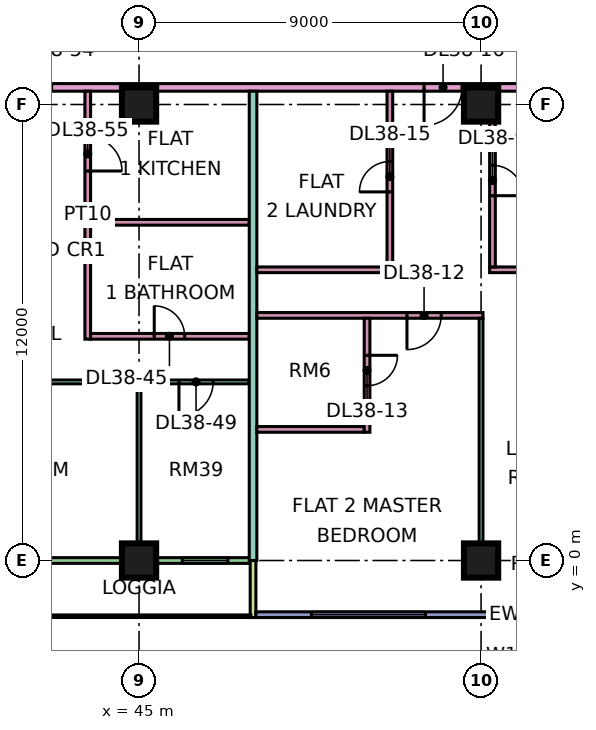
"""IFC4 building model, lengths in metres.
Left out: names, types, materials, properties, quantities, classifications, styles, units other than length and angle.
Written with IfcOpenShell. Run it as: python <this file> out.ifc"""

import sys

from ifc_helpers import new_model, si_unit, direction, frame, frame_2d, origin, origin_2d, place, context, subcontext, project, spatial, rectangle, extrude, element, fill, save


model = new_model("IFC4")
c1 = context("Model", 3, precision=1e-05, world=origin(), true_north=direction((0.0, 1.0)))
c2 = subcontext(c1, "Body", "Model", "MODEL_VIEW")
j1 = project(units=[si_unit("LENGTHUNIT", "METRE"), si_unit("PLANEANGLEUNIT", "RADIAN")], contexts=[c1])
p1 = place(None, origin())
s1 = spatial("IfcSite", under=j1, at=p1, CompositionType="ELEMENT")
p2 = place(p1, origin())
s2 = spatial("IfcBuilding", under=s1, at=p2, CompositionType="ELEMENT")
p3 = place(p2, frame((0.0, 0.0, 168.65)))
s3 = spatial("IfcBuildingStorey", under=s2, at=p3, CompositionType="ELEMENT", Elevation=168.65)
for number, where, z_axis, x_axis in (
    (1, (45.0, 0.0, 0.0), (0.0, 0.0, 1.0), (1.0, 0.0, 0.0)),
    (2, (45.0, 12.0, 0.0), (0.0, 0.0, 1.0), (1.0, 0.0, 0.0)),
    (3, (54.0, 0.0, 0.0), (0.0, 0.0, 1.0), (1.0, 0.0, 0.0)),
    (4, (54.0, 12.0, 0.0), (0.0, 0.0, 1.0), (1.0, 0.0, 0.0)),
):
    element("IfcColumn", number, at=place(p3, frame(where, z_axis=z_axis, x_axis=x_axis)), inside=s3, PredefinedType="COLUMN", context=c2, shape_type="SweptSolid", body=[
        extrude(rectangle(XDim=0.9, YDim=0.9, at=origin_2d()), origin(), (0.0, 0.0, 1.0), 3.75),
    ])
p4 = place(p3, frame((36.075, 0.0, 0.0), z_axis=(0.0, 0.0, 1.0), x_axis=(1.0, 0.0, 0.0)))
e5 = element("IfcWall", 5, at=p4, inside=s3, PredefinedType="SOLIDWALL", context=c2, shape_type="SweptSolid", body=[
    extrude(rectangle(XDim=11.85, YDim=0.15, at=frame_2d((5.925, 0.0))), origin(), (0.0, 0.0, 1.0), 3.35),
])
p5 = place(p4, frame((3.525, 0.0, 0.0)))
e6 = element("IfcOpeningElement", 6, at=p5, cuts=e5, PredefinedType="OPENING", context=c2, shape_type="SweptSolid", body=[
    extrude(rectangle(XDim=1.8, YDim=2.4, at=frame_2d((0.9, 1.2))), frame((0.0, 0.085, 0.0), z_axis=(0.0, -1.0, 0.0), x_axis=(1.0, 0.0, 0.0)), (0.0, 0.0, 1.0), 0.17),
])
p6 = place(p4, frame((10.062, 0.0, 0.45)))
e7 = element("IfcOpeningElement", 7, at=p6, cuts=e5, PredefinedType="OPENING", context=c2, shape_type="SweptSolid", body=[
    extrude(rectangle(XDim=1.2, YDim=2.4, at=frame_2d((0.6, 1.2))), frame((0.0, 0.085, 0.0), z_axis=(0.0, -1.0, 0.0), x_axis=(1.0, 0.0, 0.0)), (0.0, 0.0, 1.0), 0.17),
])
p7 = place(p3, frame((48.0, -1.5, 0.0), z_axis=(0.0, 0.0, 1.0), x_axis=(0.0, 1.0, 0.0)))
e8 = element("IfcWall", 8, at=p7, inside=s3, PredefinedType="SOLIDWALL", context=c2, shape_type="SweptSolid", body=[
    extrude(rectangle(XDim=1.5, YDim=0.15, at=frame_2d((0.75, 0.0))), origin(), (0.0, 0.0, 1.0), 3.35),
])
p8 = place(p3, frame((48.075, -1.425, 0.0), z_axis=(0.0, 0.0, 1.0), x_axis=(1.0, 0.0, 0.0)))
e9 = element("IfcWall", 9, at=p8, inside=s3, PredefinedType="SOLIDWALL", context=c2, shape_type="SweptSolid", body=[
    extrude(rectangle(XDim=13.425, YDim=0.15, at=frame_2d((6.712, 0.0))), origin(), (0.0, 0.0, 1.0), 3.35),
])
p9 = place(p8, frame((1.462, 0.0, 0.45)))
e10 = element("IfcOpeningElement", 10, at=p9, cuts=e9, PredefinedType="OPENING", context=c2, shape_type="SweptSolid", body=[
    extrude(rectangle(XDim=3.0, YDim=2.4, at=frame_2d((1.5, 1.2))), frame((0.0, 0.085, 0.0), z_axis=(0.0, -1.0, 0.0), x_axis=(1.0, 0.0, 0.0)), (0.0, 0.0, 1.0), 0.17),
])
p10 = place(p8, frame((6.525, 0.0, 0.45)))
e11 = element("IfcOpeningElement", 11, at=p10, cuts=e9, PredefinedType="OPENING", context=c2, shape_type="SweptSolid", body=[
    extrude(rectangle(XDim=1.8, YDim=2.4, at=frame_2d((0.9, 1.2))), frame((0.0, 0.085, 0.0), z_axis=(0.0, -1.0, 0.0), x_axis=(1.0, 0.0, 0.0)), (0.0, 0.0, 1.0), 0.17),
])
p11 = place(p8, frame((9.525, 0.0, 0.45)))
e12 = element("IfcOpeningElement", 12, at=p11, cuts=e9, PredefinedType="OPENING", context=c2, shape_type="SweptSolid", body=[
    extrude(rectangle(XDim=1.8, YDim=2.4, at=frame_2d((0.9, 1.2))), frame((0.0, 0.085, 0.0), z_axis=(0.0, -1.0, 0.0), x_axis=(1.0, 0.0, 0.0)), (0.0, 0.0, 1.0), 0.17),
])
p12 = place(p8, frame((12.225, 0.0, 0.45)))
e13 = element("IfcOpeningElement", 13, at=p12, cuts=e9, PredefinedType="OPENING", context=c2, shape_type="SweptSolid", body=[
    extrude(rectangle(XDim=0.9, YDim=2.4, at=frame_2d((0.45, 1.2))), frame((0.0, 0.085, 0.0), z_axis=(0.0, -1.0, 0.0), x_axis=(1.0, 0.0, 0.0)), (0.0, 0.0, 1.0), 0.17),
])
p13 = place(p3, frame((33.05, 4.7, 0.0), z_axis=(0.0, 0.0, 1.0), x_axis=(1.0, 0.0, 0.0)))
e14 = element("IfcWall", 14, at=p13, inside=s3, PredefinedType="PARTITIONING", context=c2, shape_type="SweptSolid", body=[
    extrude(rectangle(XDim=14.85, YDim=0.1, at=frame_2d((7.425, 0.0))), origin(), (0.0, 0.0, 1.0), 3.35),
])
p14 = place(p13, frame((1.0, 0.0, 0.0)))
e15 = element("IfcOpeningElement", 15, at=p14, cuts=e14, PredefinedType="OPENING", context=c2, shape_type="SweptSolid", body=[
    extrude(rectangle(XDim=0.9, YDim=2.1, at=frame_2d((0.45, 1.05))), frame((0.0, 0.06, 0.0), z_axis=(0.0, -1.0, 0.0), x_axis=(1.0, 0.0, 0.0)), (0.0, 0.0, 1.0), 0.12),
])
p15 = place(p13, frame((13.0, 0.0, 0.0)))
e16 = element("IfcOpeningElement", 16, at=p15, cuts=e14, PredefinedType="OPENING", context=c2, shape_type="SweptSolid", body=[
    extrude(rectangle(XDim=0.9, YDim=2.1, at=frame_2d((0.45, 1.05))), frame((0.0, 0.06, 0.0), z_axis=(0.0, -1.0, 0.0), x_axis=(1.0, 0.0, 0.0)), (0.0, 0.0, 1.0), 0.12),
])
p16 = place(p13, frame((7.0, 0.0, 0.0)))
e17 = element("IfcOpeningElement", 17, at=p16, cuts=e14, PredefinedType="OPENING", context=c2, shape_type="SweptSolid", body=[
    extrude(rectangle(XDim=0.9, YDim=2.1, at=frame_2d((0.45, 1.05))), frame((0.0, 0.06, 0.0), z_axis=(0.0, -1.0, 0.0), x_axis=(1.0, 0.0, 0.0)), (0.0, 0.0, 1.0), 0.12),
])
p17 = place(p3, frame((40.65, 12.45, 0.0), z_axis=(0.0, 0.0, 1.0), x_axis=(1.0, 0.0, 0.0)))
e18 = element("IfcWall", 18, at=p17, inside=s3, PredefinedType="PARTITIONING", context=c2, shape_type="SweptSolid", body=[
    extrude(rectangle(XDim=22.276, YDim=0.2, at=frame_2d((11.138, 0.0))), origin(), (0.0, 0.0, 1.0), 3.35),
])
p18 = place(p17, frame((11.85, 0.0, 0.0)))
e19 = element("IfcOpeningElement", 19, at=p18, cuts=e18, PredefinedType="OPENING", context=c2, shape_type="SweptSolid", body=[
    extrude(rectangle(XDim=1.0, YDim=2.1, at=frame_2d((0.5, 1.05))), frame((0.0, 0.11, 0.0), z_axis=(0.0, -1.0, 0.0), x_axis=(1.0, 0.0, 0.0)), (0.0, 0.0, 1.0), 0.22),
])
p19 = place(p17, frame((1.05, 0.0, 0.0)))
e20 = element("IfcOpeningElement", 20, at=p19, cuts=e18, PredefinedType="OPENING", context=c2, shape_type="SweptSolid", body=[
    extrude(rectangle(XDim=1.0, YDim=2.1, at=frame_2d((0.5, 1.05))), frame((0.0, 0.11, 0.0), z_axis=(0.0, -1.0, 0.0), x_axis=(1.0, 0.0, 0.0)), (0.0, 0.0, 1.0), 0.22),
])
p20 = place(p3, frame((43.65, 5.825, 0.0), z_axis=(0.0, 0.0, 1.0), x_axis=(0.0, 1.0, 0.0)))
e21 = element("IfcWall", 21, at=p20, inside=s3, PredefinedType="PARTITIONING", context=c2, shape_type="SweptSolid", body=[
    extrude(rectangle(XDim=6.525, YDim=0.15, at=frame_2d((3.263, 0.0))), origin(), (0.0, 0.0, 1.0), 3.35),
])
p21 = place(p20, frame((4.425, 0.0, 0.0)))
e22 = element("IfcOpeningElement", 22, at=p21, cuts=e21, PredefinedType="OPENING", context=c2, shape_type="SweptSolid", body=[
    extrude(rectangle(XDim=0.9, YDim=2.1, at=frame_2d((0.45, 1.05))), frame((0.0, 0.085, 0.0), z_axis=(0.0, -1.0, 0.0), x_axis=(1.0, 0.0, 0.0)), (0.0, 0.0, 1.0), 0.17),
])
p22 = place(p3, frame((43.725, 5.9, 0.0), z_axis=(0.0, 0.0, 1.0), x_axis=(1.0, 0.0, 0.0)))
e23 = element("IfcWall", 23, at=p22, inside=s3, PredefinedType="PARTITIONING", context=c2, shape_type="SweptSolid", body=[
    extrude(rectangle(XDim=4.175, YDim=0.15, at=frame_2d((2.087, 0.0))), origin(), (0.0, 0.0, 1.0), 3.35),
])
p23 = place(p22, frame((1.675, 0.0, 0.0)))
e24 = element("IfcOpeningElement", 24, at=p23, cuts=e23, PredefinedType="OPENING", context=c2, shape_type="SweptSolid", body=[
    extrude(rectangle(XDim=0.8, YDim=2.1, at=frame_2d((0.4, 1.05))), frame((0.0, 0.085, 0.0), z_axis=(0.0, -1.0, 0.0), x_axis=(1.0, 0.0, 0.0)), (0.0, 0.0, 1.0), 0.17),
])
p24 = place(p3, frame((43.725, 8.9, 0.0), z_axis=(0.0, 0.0, 1.0), x_axis=(1.0, 0.0, 0.0)))
e25 = element("IfcWall", 25, at=p24, inside=s3, PredefinedType="PARTITIONING", context=c2, shape_type="SweptSolid", body=[
    extrude(rectangle(XDim=4.175, YDim=0.15, at=frame_2d((2.087, 0.0))), origin(), (0.0, 0.0, 1.0), 3.35),
])
p25 = place(p3, frame((45.0, 0.074, 0.0), z_axis=(0.0, 0.0, 1.0), x_axis=(0.0, 1.0, 0.0)))
e26 = element("IfcWall", 26, at=p25, inside=s3, PredefinedType="PARTITIONING", context=c2, shape_type="SweptSolid", body=[
    extrude(rectangle(XDim=4.576, YDim=0.1, at=frame_2d((2.288, 0.0))), origin(), (0.0, 0.0, 1.0), 3.35),
])
p26 = place(p3, frame((48.0, 0.0, 0.0), z_axis=(0.0, 0.0, 1.0), x_axis=(0.0, 1.0, 0.0)))
e27 = element("IfcWall", 27, at=p26, inside=s3, PredefinedType="PARTITIONING", context=c2, shape_type="SweptSolid", body=[
    extrude(rectangle(XDim=12.35, YDim=0.2, at=frame_2d((6.175, 0.0))), origin(), (0.0, 0.0, 1.0), 3.35),
])
p27 = place(p3, frame((48.1, 3.45, 0.0), z_axis=(0.0, 0.0, 1.0), x_axis=(1.0, 0.0, 0.0)))
e28 = element("IfcWall", 28, at=p27, inside=s3, PredefinedType="PARTITIONING", context=c2, shape_type="SweptSolid", body=[
    extrude(rectangle(XDim=2.825, YDim=0.15, at=frame_2d((1.413, 0.0))), origin(), (0.0, 0.0, 1.0), 3.35),
])
p28 = place(p3, frame((48.1, 6.45, 0.0), z_axis=(0.0, 0.0, 1.0), x_axis=(1.0, 0.0, 0.0)))
e29 = element("IfcWall", 29, at=p28, inside=s3, PredefinedType="PARTITIONING", context=c2, shape_type="SweptSolid", body=[
    extrude(rectangle(XDim=5.95, YDim=0.15, at=frame_2d((2.975, 0.0))), origin(), (0.0, 0.0, 1.0), 3.35),
])
p29 = place(p28, frame((3.95, 0.0, 0.0)))
e30 = element("IfcOpeningElement", 30, at=p29, cuts=e29, PredefinedType="OPENING", context=c2, shape_type="SweptSolid", body=[
    extrude(rectangle(XDim=0.9, YDim=2.1, at=frame_2d((0.45, 1.05))), frame((0.0, 0.085, 0.0), z_axis=(0.0, -1.0, 0.0), x_axis=(1.0, 0.0, 0.0)), (0.0, 0.0, 1.0), 0.17),
])
p30 = place(p3, frame((48.1, 7.65, 0.0), z_axis=(0.0, 0.0, 1.0), x_axis=(1.0, 0.0, 0.0)))
e31 = element("IfcWall", 31, at=p30, inside=s3, PredefinedType="PARTITIONING", context=c2, shape_type="SweptSolid", body=[
    extrude(rectangle(XDim=3.425, YDim=0.15, at=frame_2d((1.712, 0.0))), origin(), (0.0, 0.0, 1.0), 3.35),
])
p31 = place(p3, frame((51.0, 3.375, 0.0), z_axis=(0.0, 0.0, 1.0), x_axis=(0.0, 1.0, 0.0)))
e32 = element("IfcWall", 32, at=p31, inside=s3, PredefinedType="PARTITIONING", context=c2, shape_type="SweptSolid", body=[
    extrude(rectangle(XDim=3.0, YDim=0.15, at=frame_2d((1.5, 0.0))), origin(), (0.0, 0.0, 1.0), 3.35),
])
p32 = place(p31, frame((1.225, 0.0, 0.0)))
e33 = element("IfcOpeningElement", 33, at=p32, cuts=e32, PredefinedType="OPENING", context=c2, shape_type="SweptSolid", body=[
    extrude(rectangle(XDim=0.8, YDim=2.1, at=frame_2d((0.4, 1.05))), frame((0.0, 0.085, 0.0), z_axis=(0.0, -1.0, 0.0), x_axis=(1.0, 0.0, 0.0)), (0.0, 0.0, 1.0), 0.17),
])
p33 = place(p3, frame((51.6, 7.575, 0.0), z_axis=(0.0, 0.0, 1.0), x_axis=(0.0, 1.0, 0.0)))
e34 = element("IfcWall", 34, at=p33, inside=s3, PredefinedType="PARTITIONING", context=c2, shape_type="SweptSolid", body=[
    extrude(rectangle(XDim=4.775, YDim=0.15, at=frame_2d((2.388, 0.0))), origin(), (0.0, 0.0, 1.0), 3.35),
])
p34 = place(p33, frame((2.125, 0.0, 0.0)))
e35 = element("IfcOpeningElement", 35, at=p34, cuts=e34, PredefinedType="OPENING", context=c2, shape_type="SweptSolid", body=[
    extrude(rectangle(XDim=0.8, YDim=2.1, at=frame_2d((0.4, 1.05))), frame((0.0, 0.085, 0.0), z_axis=(0.0, -1.0, 0.0), x_axis=(1.0, 0.0, 0.0)), (0.0, 0.0, 1.0), 0.17),
])
p35 = place(p3, frame((54.0, 0.0, 0.0), z_axis=(0.0, 0.0, 1.0), x_axis=(0.0, 1.0, 0.0)))
e36 = element("IfcWall", 36, at=p35, inside=s3, PredefinedType="PARTITIONING", context=c2, shape_type="SweptSolid", body=[
    extrude(rectangle(XDim=6.375, YDim=0.1, at=frame_2d((3.188, 0.0))), origin(), (0.0, 0.0, 1.0), 3.35),
])
p36 = place(p3, frame((54.225, 7.65, 0.0), z_axis=(0.0, 0.0, 1.0), x_axis=(1.0, 0.0, 0.0)))
e37 = element("IfcWall", 37, at=p36, inside=s3, PredefinedType="PARTITIONING", context=c2, shape_type="SweptSolid", body=[
    extrude(rectangle(XDim=10.125, YDim=0.15, at=frame_2d((5.062, 0.0))), origin(), (0.0, 0.0, 1.0), 3.35),
])
p37 = place(p36, frame((5.325, 0.0, 0.0)))
e38 = element("IfcOpeningElement", 38, at=p37, cuts=e37, PredefinedType="OPENING", context=c2, shape_type="SweptSolid", body=[
    extrude(rectangle(XDim=0.9, YDim=2.1, at=frame_2d((0.45, 1.05))), frame((0.0, 0.085, 0.0), z_axis=(0.0, -1.0, 0.0), x_axis=(1.0, 0.0, 0.0)), (0.0, 0.0, 1.0), 0.17),
])
p38 = place(p3, frame((54.3, 7.725, 0.0), z_axis=(0.0, 0.0, 1.0), x_axis=(0.0, 1.0, 0.0)))
e39 = element("IfcWall", 39, at=p38, inside=s3, PredefinedType="PARTITIONING", context=c2, shape_type="SweptSolid", body=[
    extrude(rectangle(XDim=4.625, YDim=0.15, at=frame_2d((2.312, 0.0))), origin(), (0.0, 0.0, 1.0), 3.35),
])
p39 = place(p38, frame((1.875, 0.0, 0.0)))
e40 = element("IfcOpeningElement", 40, at=p39, cuts=e39, PredefinedType="OPENING", context=c2, shape_type="SweptSolid", body=[
    extrude(rectangle(XDim=0.8, YDim=2.1, at=frame_2d((0.4, 1.05))), frame((0.0, 0.085, 0.0), z_axis=(0.0, -1.0, 0.0), x_axis=(1.0, 0.0, 0.0)), (0.0, 0.0, 1.0), 0.17),
])
p40 = place(p6, origin())
e41 = element("IfcWindow", 41, at=p40, inside=s3, PartitioningType="SINGLE_PANEL", PredefinedType="WINDOW", context=c2, shape_type="SweptSolid", body=[
    extrude(rectangle(XDim=1.2, YDim=2.4, at=frame_2d((0.6, 1.2))), frame((0.0, 0.03, 0.0), z_axis=(0.0, -1.0, 0.0), x_axis=(1.0, 0.0, 0.0)), (0.0, 0.0, 1.0), 0.06),
])
fill(e7, e41)
p41 = place(p9, origin())
e42 = element("IfcWindow", 42, at=p41, inside=s3, PartitioningType="SINGLE_PANEL", PredefinedType="WINDOW", context=c2, shape_type="SweptSolid", body=[
    extrude(rectangle(XDim=3.0, YDim=2.4, at=frame_2d((1.5, 1.2))), frame((0.0, 0.03, 0.0), z_axis=(0.0, -1.0, 0.0), x_axis=(1.0, 0.0, 0.0)), (0.0, 0.0, 1.0), 0.06),
])
fill(e10, e42)
p42 = place(p10, origin())
e43 = element("IfcWindow", 43, at=p42, inside=s3, PartitioningType="SINGLE_PANEL", PredefinedType="WINDOW", context=c2, shape_type="SweptSolid", body=[
    extrude(rectangle(XDim=1.8, YDim=2.4, at=frame_2d((0.9, 1.2))), frame((0.0, 0.03, 0.0), z_axis=(0.0, -1.0, 0.0), x_axis=(1.0, 0.0, 0.0)), (0.0, 0.0, 1.0), 0.06),
])
fill(e11, e43)
p43 = place(p39, frame((0.8, 0.0, 0.0), z_axis=(0.0, 0.0, 1.0), x_axis=(-1.0, 0.0, 0.0)))
e44 = element("IfcDoor", 44, at=p43, inside=s3, OperationType="SINGLE_SWING_LEFT", PredefinedType="DOOR", context=c2, shape_type="SweptSolid", body=[
    extrude(rectangle(XDim=0.8, YDim=2.1, at=frame_2d((0.4, 1.05))), frame((0.0, 0.025, 0.0), z_axis=(0.0, -1.0, 0.0), x_axis=(1.0, 0.0, 0.0)), (0.0, 0.0, 1.0), 0.05),
])
fill(e40, e44)
p44 = place(p29, frame((0.9, 0.0, 0.0), z_axis=(0.0, 0.0, 1.0), x_axis=(-1.0, 0.0, 0.0)))
e45 = element("IfcDoor", 45, at=p44, inside=s3, OperationType="SINGLE_SWING_LEFT", PredefinedType="DOOR", context=c2, shape_type="SweptSolid", body=[
    extrude(rectangle(XDim=0.9, YDim=2.1, at=frame_2d((0.45, 1.05))), frame((0.0, 0.025, 0.0), z_axis=(0.0, -1.0, 0.0), x_axis=(1.0, 0.0, 0.0)), (0.0, 0.0, 1.0), 0.05),
])
fill(e30, e45)
p45 = place(p32, origin())
e46 = element("IfcDoor", 46, at=p45, inside=s3, OperationType="SINGLE_SWING_RIGHT", PredefinedType="DOOR", context=c2, shape_type="SweptSolid", body=[
    extrude(rectangle(XDim=0.8, YDim=2.1, at=frame_2d((0.4, 1.05))), frame((0.0, 0.025, 0.0), z_axis=(0.0, -1.0, 0.0), x_axis=(1.0, 0.0, 0.0)), (0.0, 0.0, 1.0), 0.05),
])
fill(e33, e46)
p46 = place(p34, origin())
e47 = element("IfcDoor", 47, at=p46, inside=s3, OperationType="SINGLE_SWING_LEFT", PredefinedType="DOOR", context=c2, shape_type="SweptSolid", body=[
    extrude(rectangle(XDim=0.8, YDim=2.1, at=frame_2d((0.4, 1.05))), frame((0.0, 0.025, 0.0), z_axis=(0.0, -1.0, 0.0), x_axis=(1.0, 0.0, 0.0)), (0.0, 0.0, 1.0), 0.05),
])
fill(e35, e47)
p47 = place(p18, frame((1.0, 0.0, 0.0), z_axis=(0.0, 0.0, 1.0), x_axis=(-1.0, 0.0, 0.0)))
e48 = element("IfcDoor", 48, at=p47, inside=s3, OperationType="SINGLE_SWING_LEFT", PredefinedType="DOOR", context=c2, shape_type="SweptSolid", body=[
    extrude(rectangle(XDim=1.0, YDim=2.1, at=frame_2d((0.5, 1.05))), frame((0.0, 0.025, 0.0), z_axis=(0.0, -1.0, 0.0), x_axis=(1.0, 0.0, 0.0)), (0.0, 0.0, 1.0), 0.05),
])
fill(e19, e48)
p48 = place(p23, origin())
e49 = element("IfcDoor", 49, at=p48, inside=s3, OperationType="SINGLE_SWING_LEFT", PredefinedType="DOOR", context=c2, shape_type="SweptSolid", body=[
    extrude(rectangle(XDim=0.8, YDim=2.1, at=frame_2d((0.4, 1.05))), frame((0.0, 0.025, 0.0), z_axis=(0.0, -1.0, 0.0), x_axis=(1.0, 0.0, 0.0)), (0.0, 0.0, 1.0), 0.05),
])
fill(e24, e49)
p49 = place(p15, frame((0.9, 0.0, 0.0), z_axis=(0.0, 0.0, 1.0), x_axis=(-1.0, 0.0, 0.0)))
e50 = element("IfcDoor", 50, at=p49, inside=s3, OperationType="SINGLE_SWING_LEFT", PredefinedType="DOOR", context=c2, shape_type="SweptSolid", body=[
    extrude(rectangle(XDim=0.9, YDim=2.1, at=frame_2d((0.45, 1.05))), frame((0.0, 0.025, 0.0), z_axis=(0.0, -1.0, 0.0), x_axis=(1.0, 0.0, 0.0)), (0.0, 0.0, 1.0), 0.05),
])
fill(e16, e50)
p50 = place(p21, frame((0.9, 0.0, 0.0), z_axis=(0.0, 0.0, 1.0), x_axis=(-1.0, 0.0, 0.0)))
e51 = element("IfcDoor", 51, at=p50, inside=s3, OperationType="SINGLE_SWING_LEFT", PredefinedType="DOOR", context=c2, shape_type="SweptSolid", body=[
    extrude(rectangle(XDim=0.9, YDim=2.1, at=frame_2d((0.45, 1.05))), frame((0.0, 0.025, 0.0), z_axis=(0.0, -1.0, 0.0), x_axis=(1.0, 0.0, 0.0)), (0.0, 0.0, 1.0), 0.05),
])
fill(e22, e51)
save(model, sys.argv[1])
